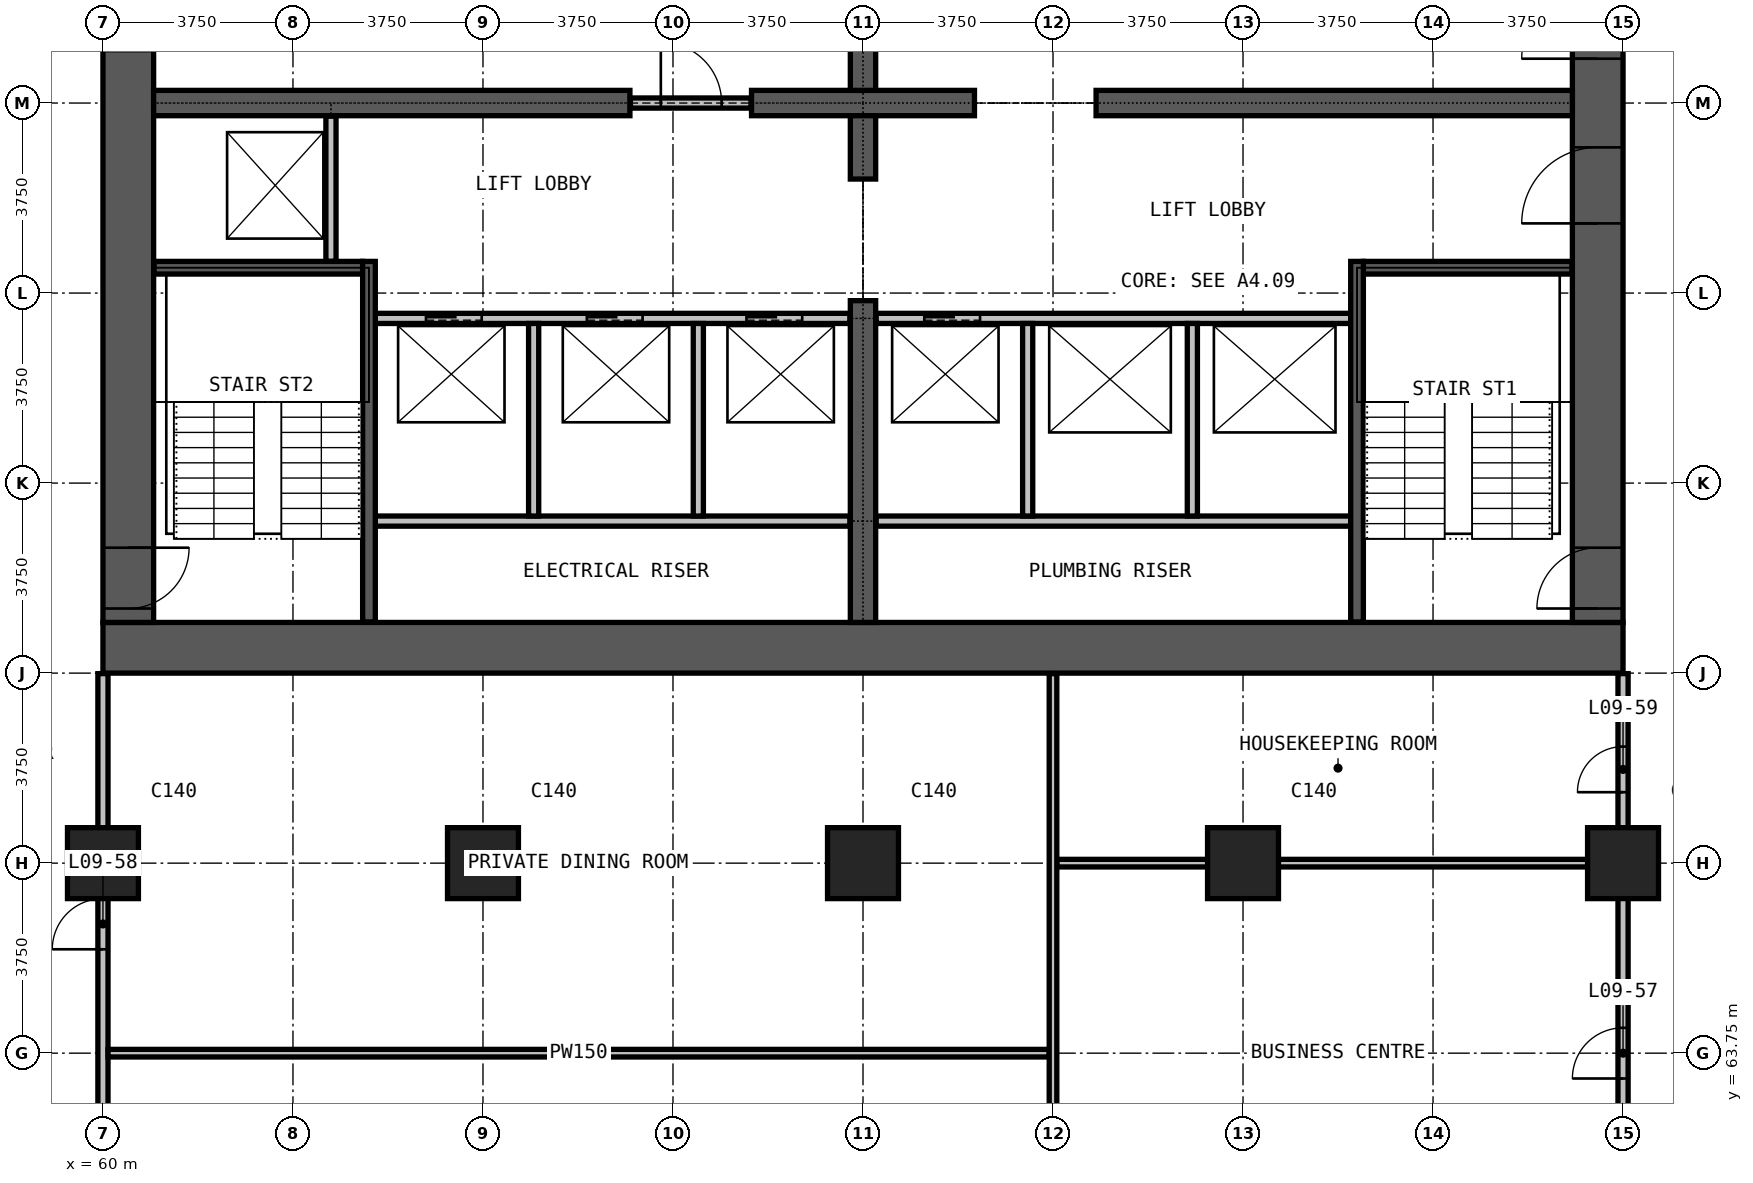
"""IFC4 building model, lengths in metres.
Left out: names, types, materials, properties, quantities, classifications, styles, units other than length and angle.
Written with IfcOpenShell. Run it as: python <this file> out.ifc"""

import sys

from ifc_helpers import new_model, si_unit, direction, frame, frame_2d, origin, origin_2d, place, context, subcontext, project, spatial, rectangle, extrude, element, fill, save


model = new_model("IFC4")
c1 = context("Model", 3, precision=1e-05, world=origin(), true_north=direction((0.0, 1.0)))
c2 = subcontext(c1, "Body", "Model", "MODEL_VIEW")
j1 = project(units=[si_unit("LENGTHUNIT", "METRE"), si_unit("PLANEANGLEUNIT", "RADIAN")], contexts=[c1])
p1 = place(None, origin())
s1 = spatial("IfcSite", under=j1, at=p1, CompositionType="ELEMENT")
p2 = place(p1, origin())
s2 = spatial("IfcBuilding", under=s1, at=p2, CompositionType="ELEMENT")
p3 = place(p2, frame((0.0, 0.0, 49.4)))
s3 = spatial("IfcBuildingStorey", under=s2, at=p3, CompositionType="ELEMENT", Elevation=49.4)
for number, where, z_axis, x_axis in (
    (1, (60.0, 67.5, 0.0), (0.0, 0.0, 1.0), (1.0, 0.0, 0.0)),
    (2, (67.5, 67.5, 0.0), (0.0, 0.0, 1.0), (1.0, 0.0, 0.0)),
    (3, (75.0, 67.5, 0.0), (0.0, 0.0, 1.0), (1.0, 0.0, 0.0)),
    (4, (82.5, 67.5, 0.0), (0.0, 0.0, 1.0), (1.0, 0.0, 0.0)),
    (5, (90.0, 67.5, 0.0), (0.0, 0.0, 1.0), (1.0, 0.0, 0.0)),
):
    element("IfcColumn", number, at=place(p3, frame(where, z_axis=z_axis, x_axis=x_axis)), inside=s3, PredefinedType="COLUMN", context=c2, shape_type="SweptSolid", body=[
        extrude(rectangle(XDim=1.4, YDim=1.4, at=origin_2d()), origin(), (0.0, 0.0, 1.0), 3.3),
    ])
p4 = place(p3, frame((60.0, 71.75, 0.0), z_axis=(0.0, 0.0, 1.0), x_axis=(1.0, 0.0, 0.0)))
e6 = element("IfcWall", 6, at=p4, inside=s3, PredefinedType="SHEAR", context=c2, shape_type="SweptSolid", body=[
    extrude(rectangle(XDim=30.0, YDim=1.0, at=frame_2d((15.0, 0.0))), origin(), (0.0, 0.0, 1.0), 3.3),
])
p5 = place(p3, frame((89.5, 72.25, 0.0), z_axis=(0.0, 0.0, 1.0), x_axis=(0.0, 1.0, 0.0)))
e7 = element("IfcWall", 7, at=p5, inside=s3, PredefinedType="SHEAR", context=c2, shape_type="SweptSolid", body=[
    extrude(rectangle(XDim=20.5, YDim=1.0, at=frame_2d((10.25, 0.0))), origin(), (0.0, 0.0, 1.0), 3.3),
])
p6 = place(p5, frame((0.275, 0.0, 0.0)))
e8 = element("IfcOpeningElement", 8, at=p6, cuts=e7, PredefinedType="OPENING", context=c2, shape_type="SweptSolid", body=[
    extrude(rectangle(XDim=1.2, YDim=2.2, at=frame_2d((0.6, 1.1))), frame((0.0, 0.51, 0.0), z_axis=(0.0, -1.0, 0.0), x_axis=(1.0, 0.0, 0.0)), (0.0, 0.0, 1.0), 1.02),
])
p7 = place(p5, frame((13.775, 0.0, 0.0)))
e9 = element("IfcOpeningElement", 9, at=p7, cuts=e7, PredefinedType="OPENING", context=c2, shape_type="SweptSolid", body=[
    extrude(rectangle(XDim=1.2, YDim=2.2, at=frame_2d((0.6, 1.1))), frame((0.0, 0.51, 0.0), z_axis=(0.0, -1.0, 0.0), x_axis=(1.0, 0.0, 0.0)), (0.0, 0.0, 1.0), 1.02),
])
p8 = place(p5, frame((7.875, 0.0, 0.0)))
e10 = element("IfcOpeningElement", 10, at=p8, cuts=e7, PredefinedType="OPENING", context=c2, shape_type="SweptSolid", body=[
    extrude(rectangle(XDim=1.5, YDim=2.2, at=frame_2d((0.75, 1.1))), frame((0.0, 0.51, 0.0), z_axis=(0.0, -1.0, 0.0), x_axis=(1.0, 0.0, 0.0)), (0.0, 0.0, 1.0), 1.02),
])
p9 = place(p5, frame((11.125, 0.0, 0.0)))
e11 = element("IfcOpeningElement", 11, at=p9, cuts=e7, PredefinedType="OPENING", context=c2, shape_type="SweptSolid", body=[
    extrude(rectangle(XDim=1.5, YDim=2.2, at=frame_2d((0.75, 1.1))), frame((0.0, 0.51, 0.0), z_axis=(0.0, -1.0, 0.0), x_axis=(1.0, 0.0, 0.0)), (0.0, 0.0, 1.0), 1.02),
])
p10 = place(p3, frame((60.5, 92.75, 0.0), z_axis=(0.0, 0.0, 1.0), x_axis=(0.0, -1.0, 0.0)))
e12 = element("IfcWall", 12, at=p10, inside=s3, PredefinedType="SHEAR", context=c2, shape_type="SweptSolid", body=[
    extrude(rectangle(XDim=20.5, YDim=1.0, at=frame_2d((10.25, 0.0))), origin(), (0.0, 0.0, 1.0), 3.3),
])
p11 = place(p10, frame((19.025, 0.0, 0.0)))
e13 = element("IfcOpeningElement", 13, at=p11, cuts=e12, PredefinedType="OPENING", context=c2, shape_type="SweptSolid", body=[
    extrude(rectangle(XDim=1.2, YDim=2.2, at=frame_2d((0.6, 1.1))), frame((0.0, 0.51, 0.0), z_axis=(0.0, -1.0, 0.0), x_axis=(1.0, 0.0, 0.0)), (0.0, 0.0, 1.0), 1.02),
])
p12 = place(p10, frame((8.025, 0.0, 0.0)))
e14 = element("IfcOpeningElement", 14, at=p12, cuts=e12, PredefinedType="OPENING", context=c2, shape_type="SweptSolid", body=[
    extrude(rectangle(XDim=1.2, YDim=2.2, at=frame_2d((0.6, 1.1))), frame((0.0, 0.51, 0.0), z_axis=(0.0, -1.0, 0.0), x_axis=(1.0, 0.0, 0.0)), (0.0, 0.0, 1.0), 1.02),
])
p13 = place(p3, frame((61.0, 82.5, 0.0), z_axis=(0.0, 0.0, 1.0), x_axis=(1.0, 0.0, 0.0)))
e15 = element("IfcWall", 15, at=p13, inside=s3, PredefinedType="SHEAR", context=c2, shape_type="SweptSolid", body=[
    extrude(rectangle(XDim=9.4, YDim=0.5, at=frame_2d((4.7, 0.0))), origin(), (0.0, 0.0, 1.0), 3.3),
])
p14 = place(p3, frame((72.8, 82.5, 0.0), z_axis=(0.0, 0.0, 1.0), x_axis=(1.0, 0.0, 0.0)))
e16 = element("IfcWall", 16, at=p14, inside=s3, PredefinedType="SHEAR", context=c2, shape_type="SweptSolid", body=[
    extrude(rectangle(XDim=4.4, YDim=0.5, at=frame_2d((2.2, 0.0))), origin(), (0.0, 0.0, 1.0), 3.3),
])
p15 = place(p3, frame((79.6, 82.5, 0.0), z_axis=(0.0, 0.0, 1.0), x_axis=(1.0, 0.0, 0.0)))
e17 = element("IfcWall", 17, at=p15, inside=s3, PredefinedType="SHEAR", context=c2, shape_type="SweptSolid", body=[
    extrude(rectangle(XDim=9.4, YDim=0.5, at=frame_2d((4.7, 0.0))), origin(), (0.0, 0.0, 1.0), 3.3),
])
p16 = place(p3, frame((75.0, 72.25, 0.0), z_axis=(0.0, 0.0, 1.0), x_axis=(0.0, 1.0, 0.0)))
e18 = element("IfcWall", 18, at=p16, inside=s3, PredefinedType="SHEAR", context=c2, shape_type="SweptSolid", body=[
    extrude(rectangle(XDim=6.35, YDim=0.5, at=frame_2d((3.175, 0.0))), origin(), (0.0, 0.0, 1.0), 3.3),
])
for number, where, z_axis, x_axis in (
    (19, (75.0, 81.0, 0.0), (0.0, 0.0, 1.0), (0.0, 1.0, 0.0)),
    (20, (75.0, 82.75, 0.0), (0.0, 0.0, 1.0), (0.0, 1.0, 0.0)),
):
    element("IfcWall", number, at=place(p3, frame(where, z_axis=z_axis, x_axis=x_axis)), inside=s3, PredefinedType="SHEAR", context=c2, shape_type="SweptSolid", body=[
        extrude(rectangle(XDim=1.25, YDim=0.5, at=frame_2d((0.625, 0.0))), origin(), (0.0, 0.0, 1.0), 3.3),
    ])
p17 = place(p3, frame((70.41, 82.5, 0.0), z_axis=(0.0, 0.0, 1.0), x_axis=(1.0, 0.0, 0.0)))
e21 = element("IfcWall", 21, at=p17, inside=s3, PredefinedType="PARTITIONING", context=c2, shape_type="SweptSolid", body=[
    extrude(rectangle(XDim=2.38, YDim=0.2, at=frame_2d((1.19, 0.0))), origin(), (0.0, 0.0, 1.0), 2.4),
])
p18 = place(p17, frame((0.6, 0.0, 0.0)))
e22 = element("IfcOpeningElement", 22, at=p18, cuts=e21, PredefinedType="OPENING", context=c2, shape_type="SweptSolid", body=[
    extrude(rectangle(XDim=1.2, YDim=2.2, at=frame_2d((0.6, 1.1))), frame((0.0, 0.11, 0.0), z_axis=(0.0, -1.0, 0.0), x_axis=(1.0, 0.0, 0.0)), (0.0, 0.0, 1.0), 0.22),
])
p19 = place(p3, frame((60.0, 52.4, 0.0), z_axis=(0.0, 0.0, 1.0), x_axis=(0.0, 1.0, 0.0)))
e23 = element("IfcWall", 23, at=p19, inside=s3, PredefinedType="PARTITIONING", context=c2, shape_type="SweptSolid", body=[
    extrude(rectangle(XDim=18.84, YDim=0.2, at=frame_2d((9.42, 0.0))), origin(), (0.0, 0.0, 1.0), 3.0),
])
p20 = place(p19, frame((13.4, 0.0, 0.0)))
e24 = element("IfcOpeningElement", 24, at=p20, cuts=e23, PredefinedType="OPENING", context=c2, shape_type="SweptSolid", body=[
    extrude(rectangle(XDim=1.0, YDim=2.2, at=frame_2d((0.5, 1.1))), frame((0.0, 0.11, 0.0), z_axis=(0.0, -1.0, 0.0), x_axis=(1.0, 0.0, 0.0)), (0.0, 0.0, 1.0), 0.22),
])
p21 = place(p3, frame((90.0, 52.4, 0.0), z_axis=(0.0, 0.0, 1.0), x_axis=(0.0, 1.0, 0.0)))
e25 = element("IfcWall", 25, at=p21, inside=s3, PredefinedType="PARTITIONING", context=c2, shape_type="SweptSolid", body=[
    extrude(rectangle(XDim=18.84, YDim=0.2, at=frame_2d((9.42, 0.0))), origin(), (0.0, 0.0, 1.0), 3.0),
])
p22 = place(p21, frame((10.85, 0.0, 0.0)))
e26 = element("IfcOpeningElement", 26, at=p22, cuts=e25, PredefinedType="OPENING", context=c2, shape_type="SweptSolid", body=[
    extrude(rectangle(XDim=1.0, YDim=2.2, at=frame_2d((0.5, 1.1))), frame((0.0, 0.11, 0.0), z_axis=(0.0, -1.0, 0.0), x_axis=(1.0, 0.0, 0.0)), (0.0, 0.0, 1.0), 0.22),
])
p23 = place(p21, frame((16.5, 0.0, 0.0)))
e27 = element("IfcOpeningElement", 27, at=p23, cuts=e25, PredefinedType="OPENING", context=c2, shape_type="SweptSolid", body=[
    extrude(rectangle(XDim=0.9, YDim=2.2, at=frame_2d((0.45, 1.1))), frame((0.0, 0.11, 0.0), z_axis=(0.0, -1.0, 0.0), x_axis=(1.0, 0.0, 0.0)), (0.0, 0.0, 1.0), 0.22),
])
p24 = place(p3, frame((60.1, 63.75, 0.0), z_axis=(0.0, 0.0, 1.0), x_axis=(1.0, 0.0, 0.0)))
e28 = element("IfcWall", 28, at=p24, inside=s3, PredefinedType="PARTITIONING", context=c2, shape_type="SweptSolid", body=[
    extrude(rectangle(XDim=18.575, YDim=0.15, at=frame_2d((9.288, 0.0))), origin(), (0.0, 0.0, 1.0), 3.0),
])
p25 = place(p3, frame((78.825, 67.5, 0.0), z_axis=(0.0, 0.0, 1.0), x_axis=(1.0, 0.0, 0.0)))
e29 = element("IfcWall", 29, at=p25, inside=s3, PredefinedType="PARTITIONING", context=c2, shape_type="SweptSolid", body=[
    extrude(rectangle(XDim=11.075, YDim=0.15, at=frame_2d((5.538, 0.0))), origin(), (0.0, 0.0, 1.0), 3.0),
])
p26 = place(p3, frame((78.75, 52.6, 0.0), z_axis=(0.0, 0.0, 1.0), x_axis=(0.0, 1.0, 0.0)))
e30 = element("IfcWall", 30, at=p26, inside=s3, PredefinedType="PARTITIONING", context=c2, shape_type="SweptSolid", body=[
    extrude(rectangle(XDim=18.64, YDim=0.15, at=frame_2d((9.32, 0.0))), origin(), (0.0, 0.0, 1.0), 3.0),
])
for number, where, z_axis, x_axis in (
    (31, (65.375, 74.25, 0.0), (0.0, 0.0, 1.0), (1.0, 0.0, 0.0)),
    (32, (75.26, 74.25, 0.0), (0.0, 0.0, 1.0), (1.0, 0.0, 0.0)),
):
    element("IfcWall", number, at=place(p3, frame(where, z_axis=z_axis, x_axis=x_axis)), inside=s3, PredefinedType="PARTITIONING", context=c2, shape_type="SweptSolid", body=[
        extrude(rectangle(XDim=9.365, YDim=0.2, at=frame_2d((4.683, 0.0))), origin(), (0.0, 0.0, 1.0), 3.0),
    ])
p27 = place(p3, frame((65.375, 78.25, 0.0), z_axis=(0.0, 0.0, 1.0), x_axis=(1.0, 0.0, 0.0)))
e33 = element("IfcWall", 33, at=p27, inside=s3, PredefinedType="PARTITIONING", context=c2, shape_type="SweptSolid", body=[
    extrude(rectangle(XDim=9.365, YDim=0.2, at=frame_2d((4.683, 0.0))), origin(), (0.0, 0.0, 1.0), 3.0),
])
p28 = place(p27, frame((1.0, 0.0, 0.0)))
e34 = element("IfcOpeningElement", 34, at=p28, cuts=e33, PredefinedType="OPENING", context=c2, shape_type="SweptSolid", body=[
    extrude(rectangle(XDim=1.1, YDim=2.2, at=frame_2d((0.55, 1.1))), frame((0.0, 0.11, 0.0), z_axis=(0.0, -1.0, 0.0), x_axis=(1.0, 0.0, 0.0)), (0.0, 0.0, 1.0), 0.22),
])
p29 = place(p27, frame((4.175, 0.0, 0.0)))
e35 = element("IfcOpeningElement", 35, at=p29, cuts=e33, PredefinedType="OPENING", context=c2, shape_type="SweptSolid", body=[
    extrude(rectangle(XDim=1.1, YDim=2.2, at=frame_2d((0.55, 1.1))), frame((0.0, 0.11, 0.0), z_axis=(0.0, -1.0, 0.0), x_axis=(1.0, 0.0, 0.0)), (0.0, 0.0, 1.0), 0.22),
])
p30 = place(p27, frame((7.325, 0.0, 0.0)))
e36 = element("IfcOpeningElement", 36, at=p30, cuts=e33, PredefinedType="OPENING", context=c2, shape_type="SweptSolid", body=[
    extrude(rectangle(XDim=1.1, YDim=2.2, at=frame_2d((0.55, 1.1))), frame((0.0, 0.11, 0.0), z_axis=(0.0, -1.0, 0.0), x_axis=(1.0, 0.0, 0.0)), (0.0, 0.0, 1.0), 0.22),
])
p31 = place(p3, frame((75.26, 78.25, 0.0), z_axis=(0.0, 0.0, 1.0), x_axis=(1.0, 0.0, 0.0)))
e37 = element("IfcWall", 37, at=p31, inside=s3, PredefinedType="PARTITIONING", context=c2, shape_type="SweptSolid", body=[
    extrude(rectangle(XDim=9.365, YDim=0.2, at=frame_2d((4.683, 0.0))), origin(), (0.0, 0.0, 1.0), 3.0),
])
p32 = place(p31, frame((0.95, 0.0, 0.0)))
e38 = element("IfcOpeningElement", 38, at=p32, cuts=e37, PredefinedType="OPENING", context=c2, shape_type="SweptSolid", body=[
    extrude(rectangle(XDim=1.1, YDim=2.2, at=frame_2d((0.55, 1.1))), frame((0.0, 0.11, 0.0), z_axis=(0.0, -1.0, 0.0), x_axis=(1.0, 0.0, 0.0)), (0.0, 0.0, 1.0), 0.22),
])
p33 = place(p3, frame((64.5, 79.375, 0.0), z_axis=(0.0, 0.0, 1.0), x_axis=(0.0, 1.0, 0.0)))
e39 = element("IfcWall", 39, at=p33, inside=s3, PredefinedType="PARTITIONING", context=c2, shape_type="SweptSolid", body=[
    extrude(rectangle(XDim=2.865, YDim=0.2, at=frame_2d((1.433, 0.0))), origin(), (0.0, 0.0, 1.0), 3.0),
])
for number, where, z_axis, x_axis in (
    (40, (68.5, 74.35, 0.0), (0.0, 0.0, 1.0), (0.0, 1.0, 0.0)),
    (41, (71.75, 74.35, 0.0), (0.0, 0.0, 1.0), (0.0, 1.0, 0.0)),
    (42, (78.25, 74.35, 0.0), (0.0, 0.0, 1.0), (0.0, 1.0, 0.0)),
    (43, (81.5, 74.35, 0.0), (0.0, 0.0, 1.0), (0.0, 1.0, 0.0)),
):
    element("IfcWall", number, at=place(p3, frame(where, z_axis=z_axis, x_axis=x_axis)), inside=s3, PredefinedType="PARTITIONING", context=c2, shape_type="SweptSolid", body=[
        extrude(rectangle(XDim=3.8, YDim=0.2, at=frame_2d((1.9, 0.0))), origin(), (0.0, 0.0, 1.0), 3.0),
    ])
for number, where, z_axis, x_axis in (
    (44, (61.01, 79.25, 0.0), (0.0, 0.0, 1.0), (1.0, 0.0, 0.0)),
    (45, (84.875, 79.25, 0.0), (0.0, 0.0, 1.0), (1.0, 0.0, 0.0)),
):
    element("IfcWall", number, at=place(p3, frame(where, z_axis=z_axis, x_axis=x_axis)), inside=s3, PredefinedType="PARTITIONING", context=c2, shape_type="SweptSolid", body=[
        extrude(rectangle(XDim=4.115, YDim=0.25, at=frame_2d((2.058, 0.0))), origin(), (0.0, 0.0, 1.0), 3.0),
    ])
for number, where, z_axis, x_axis in (
    (46, (65.25, 72.26, 0.0), (0.0, 0.0, 1.0), (0.0, 1.0, 0.0)),
    (47, (84.75, 72.26, 0.0), (0.0, 0.0, 1.0), (0.0, 1.0, 0.0)),
):
    element("IfcWall", number, at=place(p3, frame(where, z_axis=z_axis, x_axis=x_axis)), inside=s3, PredefinedType="PARTITIONING", context=c2, shape_type="SweptSolid", body=[
        extrude(rectangle(XDim=7.115, YDim=0.25, at=frame_2d((3.558, 0.0))), origin(), (0.0, 0.0, 1.0), 3.0),
    ])
p34 = place(p28, origin())
e48 = element("IfcDoor", 48, at=p34, inside=s3, OperationType="DOUBLE_DOOR_SLIDING", PredefinedType="DOOR", context=c2, shape_type="SweptSolid", body=[
    extrude(rectangle(XDim=1.1, YDim=2.2, at=frame_2d((0.55, 1.1))), frame((0.0, 0.025, 0.0), z_axis=(0.0, -1.0, 0.0), x_axis=(1.0, 0.0, 0.0)), (0.0, 0.0, 1.0), 0.05),
])
fill(e34, e48)
p35 = place(p29, origin())
e49 = element("IfcDoor", 49, at=p35, inside=s3, OperationType="DOUBLE_DOOR_SLIDING", PredefinedType="DOOR", context=c2, shape_type="SweptSolid", body=[
    extrude(rectangle(XDim=1.1, YDim=2.2, at=frame_2d((0.55, 1.1))), frame((0.0, 0.025, 0.0), z_axis=(0.0, -1.0, 0.0), x_axis=(1.0, 0.0, 0.0)), (0.0, 0.0, 1.0), 0.05),
])
fill(e35, e49)
p36 = place(p30, origin())
e50 = element("IfcDoor", 50, at=p36, inside=s3, OperationType="DOUBLE_DOOR_SLIDING", PredefinedType="DOOR", context=c2, shape_type="SweptSolid", body=[
    extrude(rectangle(XDim=1.1, YDim=2.2, at=frame_2d((0.55, 1.1))), frame((0.0, 0.025, 0.0), z_axis=(0.0, -1.0, 0.0), x_axis=(1.0, 0.0, 0.0)), (0.0, 0.0, 1.0), 0.05),
])
fill(e36, e50)
p37 = place(p32, origin())
e51 = element("IfcDoor", 51, at=p37, inside=s3, OperationType="DOUBLE_DOOR_SLIDING", PredefinedType="DOOR", context=c2, shape_type="SweptSolid", body=[
    extrude(rectangle(XDim=1.1, YDim=2.2, at=frame_2d((0.55, 1.1))), frame((0.0, 0.025, 0.0), z_axis=(0.0, -1.0, 0.0), x_axis=(1.0, 0.0, 0.0)), (0.0, 0.0, 1.0), 0.05),
])
fill(e38, e51)
p38 = place(p18, origin())
e52 = element("IfcDoor", 52, at=p38, inside=s3, OperationType="SINGLE_SWING_RIGHT", PredefinedType="DOOR", context=c2, shape_type="SweptSolid", body=[
    extrude(rectangle(XDim=1.2, YDim=2.2, at=frame_2d((0.6, 1.1))), frame((0.0, 0.025, 0.0), z_axis=(0.0, -1.0, 0.0), x_axis=(1.0, 0.0, 0.0)), (0.0, 0.0, 1.0), 0.05),
])
fill(e22, e52)
p39 = place(p6, origin())
e53 = element("IfcDoor", 53, at=p39, inside=s3, OperationType="SINGLE_SWING_LEFT", PredefinedType="DOOR", context=c2, shape_type="SweptSolid", body=[
    extrude(rectangle(XDim=1.2, YDim=2.2, at=frame_2d((0.6, 1.1))), frame((0.0, 0.025, 0.0), z_axis=(0.0, -1.0, 0.0), x_axis=(1.0, 0.0, 0.0)), (0.0, 0.0, 1.0), 0.05),
])
fill(e8, e53)
p40 = place(p11, origin())
e54 = element("IfcDoor", 54, at=p40, inside=s3, OperationType="SINGLE_SWING_LEFT", PredefinedType="DOOR", context=c2, shape_type="SweptSolid", body=[
    extrude(rectangle(XDim=1.2, YDim=2.2, at=frame_2d((0.6, 1.1))), frame((0.0, 0.025, 0.0), z_axis=(0.0, -1.0, 0.0), x_axis=(1.0, 0.0, 0.0)), (0.0, 0.0, 1.0), 0.05),
])
fill(e13, e54)
p41 = place(p8, origin())
e55 = element("IfcDoor", 55, at=p41, inside=s3, OperationType="DOUBLE_DOOR_SINGLE_SWING", PredefinedType="DOOR", context=c2, shape_type="SweptSolid", body=[
    extrude(rectangle(XDim=1.5, YDim=2.2, at=frame_2d((0.75, 1.1))), frame((0.0, 0.025, 0.0), z_axis=(0.0, -1.0, 0.0), x_axis=(1.0, 0.0, 0.0)), (0.0, 0.0, 1.0), 0.05),
])
fill(e10, e55)
p42 = place(p9, origin())
e56 = element("IfcDoor", 56, at=p42, inside=s3, OperationType="DOUBLE_DOOR_SINGLE_SWING", PredefinedType="DOOR", context=c2, shape_type="SweptSolid", body=[
    extrude(rectangle(XDim=1.5, YDim=2.2, at=frame_2d((0.75, 1.1))), frame((0.0, 0.025, 0.0), z_axis=(0.0, -1.0, 0.0), x_axis=(1.0, 0.0, 0.0)), (0.0, 0.0, 1.0), 0.05),
])
fill(e11, e56)
p43 = place(p22, origin())
e57 = element("IfcDoor", 57, at=p43, inside=s3, OperationType="SINGLE_SWING_LEFT", PredefinedType="DOOR", context=c2, shape_type="SweptSolid", body=[
    extrude(rectangle(XDim=1.0, YDim=2.2, at=frame_2d((0.5, 1.1))), frame((0.0, 0.025, 0.0), z_axis=(0.0, -1.0, 0.0), x_axis=(1.0, 0.0, 0.0)), (0.0, 0.0, 1.0), 0.05),
])
fill(e26, e57)
p44 = place(p20, origin())
e58 = element("IfcDoor", 58, at=p44, inside=s3, OperationType="SINGLE_SWING_LEFT", PredefinedType="DOOR", context=c2, shape_type="SweptSolid", body=[
    extrude(rectangle(XDim=1.0, YDim=2.2, at=frame_2d((0.5, 1.1))), frame((0.0, 0.025, 0.0), z_axis=(0.0, -1.0, 0.0), x_axis=(1.0, 0.0, 0.0)), (0.0, 0.0, 1.0), 0.05),
])
fill(e24, e58)
p45 = place(p23, origin())
e59 = element("IfcDoor", 59, at=p45, inside=s3, OperationType="SINGLE_SWING_LEFT", PredefinedType="DOOR", context=c2, shape_type="SweptSolid", body=[
    extrude(rectangle(XDim=0.9, YDim=2.2, at=frame_2d((0.45, 1.1))), frame((0.0, 0.025, 0.0), z_axis=(0.0, -1.0, 0.0), x_axis=(1.0, 0.0, 0.0)), (0.0, 0.0, 1.0), 0.05),
])
fill(e27, e59)
save(model, sys.argv[1])
